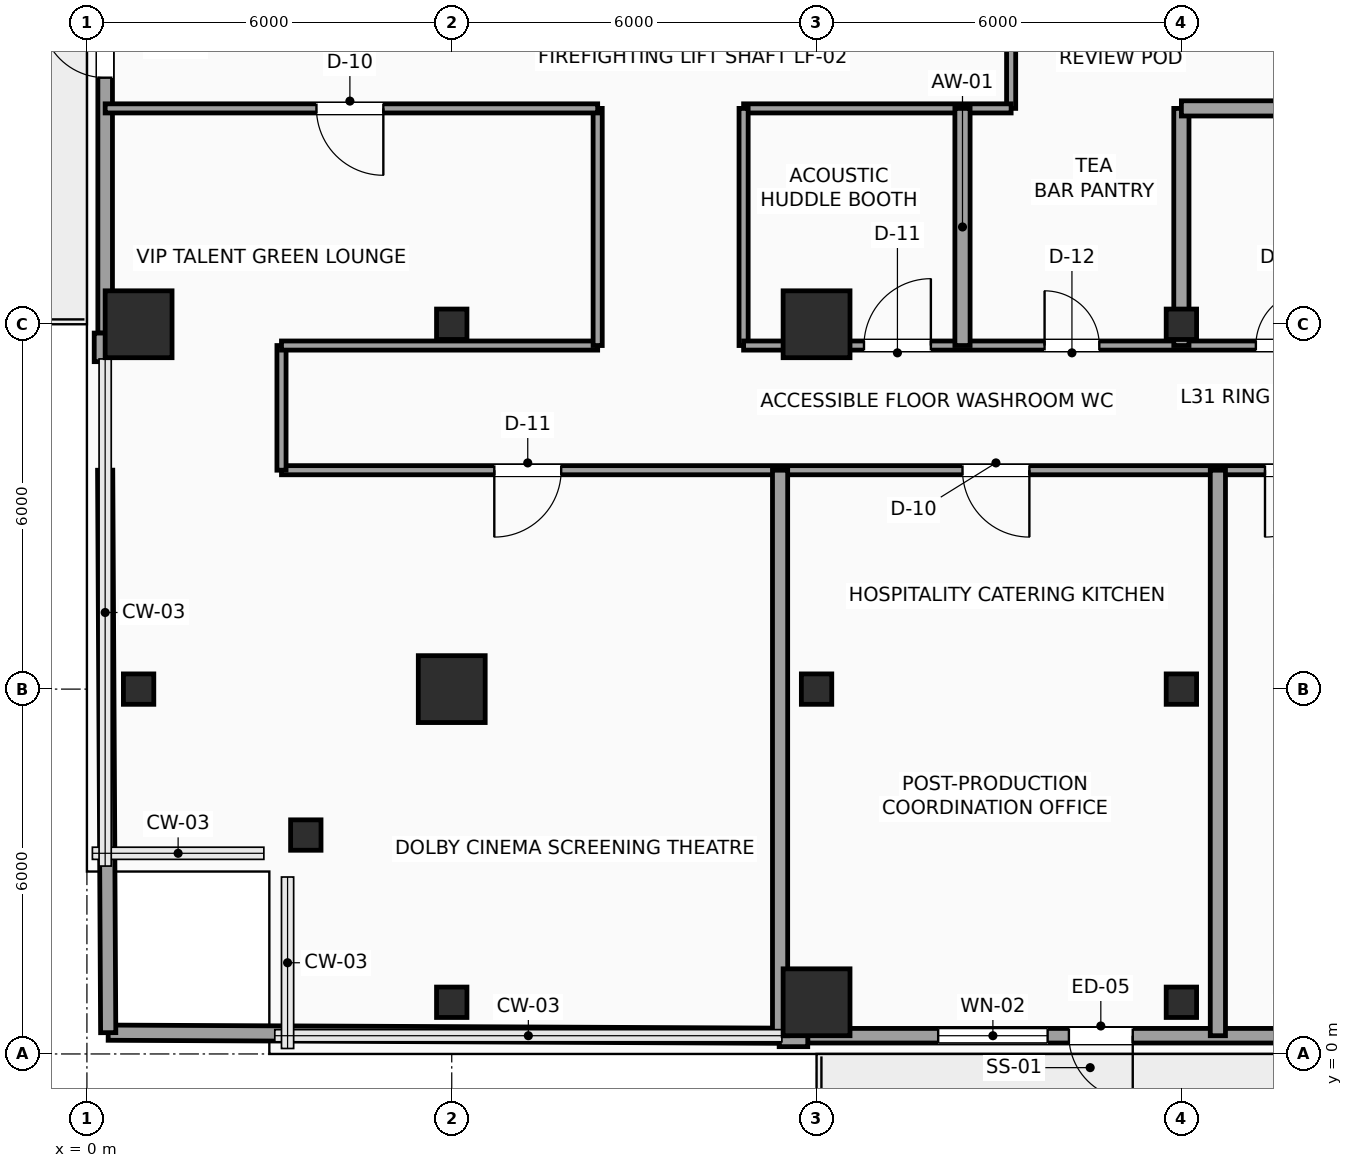
"""IFC4 building model, lengths in metres.
Left out: names, types, materials, properties, quantities, classifications, styles, units other than length and angle.
Written with IfcOpenShell. Run it as: python <this file> out.ifc"""

import sys

from ifc_helpers import new_model, si_unit, direction, frame, frame_2d, origin, origin_2d, place, context, subcontext, project, spatial, rectangle, hollow_rectangle, extrude, element, fill, save


model = new_model("IFC4")
c1 = context("Model", 3, precision=1e-05, world=origin(), true_north=direction((0.0, 1.0)))
c2 = subcontext(c1, "Body", "Model", "MODEL_VIEW")
j1 = project(units=[si_unit("LENGTHUNIT", "METRE"), si_unit("PLANEANGLEUNIT", "RADIAN")], contexts=[c1])
p1 = place(None, origin())
s1 = spatial("IfcSite", under=j1, at=p1, CompositionType="ELEMENT")
p2 = place(p1, origin())
s2 = spatial("IfcBuilding", under=s1, at=p2, CompositionType="ELEMENT")
p3 = place(p2, frame((0.0, 0.0, 130.65)))
s3 = spatial("IfcBuildingStorey", under=s2, at=p3, CompositionType="ELEMENT", Elevation=130.65)
for number, where, z_axis, x_axis in (
    (1, (3.6, 3.6, 0.0), (0.0, 0.0, 1.0), (1.0, 0.0, 0.0)),
    (2, (0.85, 6.0, 0.0), (0.0, 0.0, 1.0), (1.0, 0.0, 0.0)),
):
    element("IfcColumn", number, at=place(p3, frame(where, z_axis=z_axis, x_axis=x_axis)), inside=s3, PredefinedType="COLUMN", context=c2, shape_type="SweptSolid", body=[
        extrude(hollow_rectangle(XDim=0.5, YDim=0.5, WallThickness=0.025, InnerFilletRadius=0.025, OuterFilletRadius=0.04, at=origin_2d()), origin(), (0.0, 0.0, 1.0), 3.75),
    ])
p4 = place(p3, frame((0.85, 12.0, 0.0), z_axis=(0.0, 0.0, 1.0), x_axis=(1.0, 0.0, 0.0)))
e3 = element("IfcColumn", 3, at=p4, inside=s3, PredefinedType="COLUMN", context=c2, shape_type="SweptSolid", body=[
    extrude(rectangle(XDim=1.1, YDim=1.1, at=origin_2d()), origin(), (0.0, 0.0, 1.0), 3.75),
])
p5 = place(p3, frame((6.0, 0.85, 0.0), z_axis=(0.0, 0.0, 1.0), x_axis=(1.0, 0.0, 0.0)))
e4 = element("IfcColumn", 4, at=p5, inside=s3, PredefinedType="COLUMN", context=c2, shape_type="SweptSolid", body=[
    extrude(hollow_rectangle(XDim=0.5, YDim=0.5, WallThickness=0.025, InnerFilletRadius=0.025, OuterFilletRadius=0.04, at=origin_2d()), origin(), (0.0, 0.0, 1.0), 3.75),
])
p6 = place(p3, frame((6.0, 6.0, 0.0), z_axis=(0.0, 0.0, 1.0), x_axis=(1.0, 0.0, 0.0)))
e5 = element("IfcColumn", 5, at=p6, inside=s3, PredefinedType="COLUMN", context=c2, shape_type="SweptSolid", body=[
    extrude(rectangle(XDim=1.1, YDim=1.1, at=origin_2d()), origin(), (0.0, 0.0, 1.0), 3.75),
])
p7 = place(p3, frame((6.0, 12.0, 0.0), z_axis=(0.0, 0.0, 1.0), x_axis=(1.0, 0.0, 0.0)))
e6 = element("IfcColumn", 6, at=p7, inside=s3, PredefinedType="COLUMN", context=c2, shape_type="SweptSolid", body=[
    extrude(hollow_rectangle(XDim=0.5, YDim=0.5, WallThickness=0.025, InnerFilletRadius=0.025, OuterFilletRadius=0.04, at=origin_2d()), origin(), (0.0, 0.0, 1.0), 3.75),
])
p8 = place(p3, frame((12.0, 0.85, 0.0), z_axis=(0.0, 0.0, 1.0), x_axis=(1.0, 0.0, 0.0)))
e7 = element("IfcColumn", 7, at=p8, inside=s3, PredefinedType="COLUMN", context=c2, shape_type="SweptSolid", body=[
    extrude(rectangle(XDim=1.1, YDim=1.1, at=origin_2d()), origin(), (0.0, 0.0, 1.0), 3.75),
])
p9 = place(p3, frame((12.0, 6.0, 0.0), z_axis=(0.0, 0.0, 1.0), x_axis=(1.0, 0.0, 0.0)))
e8 = element("IfcColumn", 8, at=p9, inside=s3, PredefinedType="COLUMN", context=c2, shape_type="SweptSolid", body=[
    extrude(hollow_rectangle(XDim=0.5, YDim=0.5, WallThickness=0.025, InnerFilletRadius=0.025, OuterFilletRadius=0.04, at=origin_2d()), origin(), (0.0, 0.0, 1.0), 3.75),
])
p10 = place(p3, frame((12.0, 12.0, 0.0), z_axis=(0.0, 0.0, 1.0), x_axis=(1.0, 0.0, 0.0)))
e9 = element("IfcColumn", 9, at=p10, inside=s3, PredefinedType="COLUMN", context=c2, shape_type="SweptSolid", body=[
    extrude(rectangle(XDim=1.1, YDim=1.1, at=origin_2d()), origin(), (0.0, 0.0, 1.0), 3.75),
])
for number, where, z_axis, x_axis in (
    (10, (18.0, 0.85, 0.0), (0.0, 0.0, 1.0), (1.0, 0.0, 0.0)),
    (11, (18.0, 6.0, 0.0), (0.0, 0.0, 1.0), (1.0, 0.0, 0.0)),
    (12, (18.0, 12.0, 0.0), (0.0, 0.0, 1.0), (1.0, 0.0, 0.0)),
):
    element("IfcColumn", number, at=place(p3, frame(where, z_axis=z_axis, x_axis=x_axis)), inside=s3, PredefinedType="COLUMN", context=c2, shape_type="SweptSolid", body=[
        extrude(hollow_rectangle(XDim=0.5, YDim=0.5, WallThickness=0.025, InnerFilletRadius=0.025, OuterFilletRadius=0.04, at=origin_2d()), origin(), (0.0, 0.0, 1.0), 3.75),
    ])
p11 = place(p3, frame((21.145, 0.3, 0.0), z_axis=(0.0, 0.0, 1.0), x_axis=(-1.0, 0.0, 0.0)))
e13 = element("IfcWall", 13, at=p11, inside=s3, PredefinedType="SOLIDWALL", context=c2, shape_type="SweptSolid", body=[
    extrude(rectangle(XDim=9.29, YDim=0.24, at=frame_2d((4.645, 0.0))), origin(), (0.0, 0.0, 1.0), 3.525),
])
p12 = place(p11, frame((3.945, 0.0, 0.0)))
e14 = element("IfcOpeningElement", 14, at=p12, cuts=e13, PredefinedType="OPENING", context=c2, shape_type="SweptSolid", body=[
    extrude(rectangle(XDim=1.05, YDim=2.2, at=frame_2d((0.525, 1.1))), frame((0.0, 0.13, 0.0), z_axis=(0.0, -1.0, 0.0), x_axis=(1.0, 0.0, 0.0)), (0.0, 0.0, 1.0), 0.26),
])
p13 = place(p11, frame((5.345, 0.0, 0.85)))
e15 = element("IfcOpeningElement", 15, at=p13, cuts=e13, PredefinedType="OPENING", context=c2, shape_type="SweptSolid", body=[
    extrude(rectangle(XDim=1.8, YDim=2.1, at=frame_2d((0.9, 1.05))), frame((0.0, 0.13, 0.0), z_axis=(0.0, -1.0, 0.0), x_axis=(1.0, 0.0, 0.0)), (0.0, 0.0, 1.0), 0.26),
])
p14 = place(p3, frame((0.3, 11.855, 0.0), z_axis=(0.0, 0.0, 1.0), x_axis=(0.0, 1.0, 0.0)))
e16 = element("IfcWall", 16, at=p14, inside=s3, PredefinedType="SOLIDWALL", context=c2, shape_type="SweptSolid", body=[
    extrude(rectangle(XDim=9.29, YDim=0.24, at=frame_2d((4.645, 0.0))), origin(), (0.0, 0.0, 1.0), 3.525),
])
p15 = place(p14, frame((4.2, 0.0, 0.0)))
e17 = element("IfcOpeningElement", 17, at=p15, cuts=e16, PredefinedType="OPENING", context=c2, shape_type="SweptSolid", body=[
    extrude(rectangle(XDim=1.05, YDim=2.2, at=frame_2d((0.525, 1.1))), frame((0.0, 0.13, 0.0), z_axis=(0.0, -1.0, 0.0), x_axis=(1.0, 0.0, 0.0)), (0.0, 0.0, 1.0), 0.26),
])
p16 = place(p14, frame((6.8, 0.0, 0.85)))
e18 = element("IfcOpeningElement", 18, at=p16, cuts=e16, PredefinedType="OPENING", context=c2, shape_type="SweptSolid", body=[
    extrude(rectangle(XDim=1.8, YDim=2.1, at=frame_2d((0.9, 1.05))), frame((0.0, 0.13, 0.0), z_axis=(0.0, -1.0, 0.0), x_axis=(1.0, 0.0, 0.0)), (0.0, 0.0, 1.0), 0.26),
])
for number, where, z_axis, x_axis in (
    (19, (0.24, 11.385, 0.0), (0.0, 0.0, 1.0), (0.0, 1.0, 0.0)),
    (20, (11.855, 0.24, 0.0), (0.0, 0.0, 1.0), (-1.0, 0.0, 0.0)),
):
    element("IfcWall", number, at=place(p3, frame(where, z_axis=z_axis, x_axis=x_axis)), inside=s3, PredefinedType="SOLIDWALL", context=c2, shape_type="SweptSolid", body=[
        extrude(rectangle(XDim=0.47, YDim=0.24, at=frame_2d((0.235, 0.0))), origin(), (0.0, 0.0, 1.0), 3.525),
    ])
p17 = place(p3, frame((21.35, 9.6, 0.0), z_axis=(0.0, 0.0, 1.0), x_axis=(-1.0, 0.0, 0.0)))
e21 = element("IfcWall", 21, at=p17, inside=s3, PredefinedType="PARTITIONING", context=c2, shape_type="SweptSolid", body=[
    extrude(rectangle(XDim=18.15, YDim=0.15, at=frame_2d((9.075, 0.0))), origin(), (0.0, 0.0, 1.0), 3.525),
])
p18 = place(p17, frame((13.55, 0.0, 0.0)))
e22 = element("IfcOpeningElement", 22, at=p18, cuts=e21, PredefinedType="OPENING", context=c2, shape_type="SweptSolid", body=[
    extrude(rectangle(XDim=1.1, YDim=2.25, at=frame_2d((0.55, 1.125))), frame((0.0, 0.085, 0.0), z_axis=(0.0, -1.0, 0.0), x_axis=(1.0, 0.0, 0.0)), (0.0, 0.0, 1.0), 0.17),
])
p19 = place(p17, frame((5.85, 0.0, 0.0)))
e23 = element("IfcOpeningElement", 23, at=p19, cuts=e21, PredefinedType="OPENING", context=c2, shape_type="SweptSolid", body=[
    extrude(rectangle(XDim=1.1, YDim=2.25, at=frame_2d((0.55, 1.125))), frame((0.0, 0.085, 0.0), z_axis=(0.0, -1.0, 0.0), x_axis=(1.0, 0.0, 0.0)), (0.0, 0.0, 1.0), 0.17),
])
p20 = place(p17, frame((0.875, 0.0, 0.0)))
e24 = element("IfcOpeningElement", 24, at=p20, cuts=e21, PredefinedType="OPENING", context=c2, shape_type="SweptSolid", body=[
    extrude(rectangle(XDim=1.1, YDim=2.25, at=frame_2d((0.55, 1.125))), frame((0.0, 0.085, 0.0), z_axis=(0.0, -1.0, 0.0), x_axis=(1.0, 0.0, 0.0)), (0.0, 0.0, 1.0), 0.17),
])
p21 = place(p3, frame((3.2, 9.6, 0.0), z_axis=(0.0, 0.0, 1.0), x_axis=(0.0, 1.0, 0.0)))
e25 = element("IfcWall", 25, at=p21, inside=s3, PredefinedType="PARTITIONING", context=c2, shape_type="SweptSolid", body=[
    extrude(rectangle(XDim=2.05, YDim=0.15, at=frame_2d((1.025, 0.0))), origin(), (0.0, 0.0, 1.0), 3.525),
])
p22 = place(p3, frame((3.2, 11.65, 0.0), z_axis=(0.0, 0.0, 1.0), x_axis=(1.0, 0.0, 0.0)))
e26 = element("IfcWall", 26, at=p22, inside=s3, PredefinedType="PARTITIONING", context=c2, shape_type="SweptSolid", body=[
    extrude(rectangle(XDim=5.2, YDim=0.15, at=frame_2d((2.6, 0.0))), origin(), (0.0, 0.0, 1.0), 3.525),
])
p23 = place(p3, frame((8.4, 11.65, 0.0), z_axis=(0.0, 0.0, 1.0), x_axis=(0.0, 1.0, 0.0)))
e27 = element("IfcWall", 27, at=p23, inside=s3, PredefinedType="PARTITIONING", context=c2, shape_type="SweptSolid", body=[
    extrude(rectangle(XDim=3.9, YDim=0.15, at=frame_2d((1.95, 0.0))), origin(), (0.0, 0.0, 1.0), 3.525),
])
p24 = place(p3, frame((8.4, 15.55, 0.0), z_axis=(0.0, 0.0, 1.0), x_axis=(-1.0, 0.0, 0.0)))
e28 = element("IfcWall", 28, at=p24, inside=s3, PredefinedType="PARTITIONING", context=c2, shape_type="SweptSolid", body=[
    extrude(rectangle(XDim=8.1, YDim=0.15, at=frame_2d((4.05, 0.0))), origin(), (0.0, 0.0, 1.0), 3.525),
])
p25 = place(p24, frame((3.525, 0.0, 0.0)))
e29 = element("IfcOpeningElement", 29, at=p25, cuts=e28, PredefinedType="OPENING", context=c2, shape_type="SweptSolid", body=[
    extrude(rectangle(XDim=1.1, YDim=2.25, at=frame_2d((0.55, 1.125))), frame((0.0, 0.085, 0.0), z_axis=(0.0, -1.0, 0.0), x_axis=(1.0, 0.0, 0.0)), (0.0, 0.0, 1.0), 0.17),
])
p26 = place(p3, frame((15.2, 17.95, 0.0), z_axis=(0.0, 0.0, 1.0), x_axis=(0.0, -1.0, 0.0)))
e30 = element("IfcWall", 30, at=p26, inside=s3, PredefinedType="PARTITIONING", context=c2, shape_type="SweptSolid", body=[
    extrude(rectangle(XDim=2.4, YDim=0.15, at=frame_2d((1.2, 0.0))), origin(), (0.0, 0.0, 1.0), 3.525),
])
p27 = place(p3, frame((15.2, 15.55, 0.0), z_axis=(0.0, 0.0, 1.0), x_axis=(-1.0, 0.0, 0.0)))
e31 = element("IfcWall", 31, at=p27, inside=s3, PredefinedType="PARTITIONING", context=c2, shape_type="SweptSolid", body=[
    extrude(rectangle(XDim=4.4, YDim=0.15, at=frame_2d((2.2, 0.0))), origin(), (0.0, 0.0, 1.0), 3.525),
])
p28 = place(p3, frame((10.8, 15.55, 0.0), z_axis=(0.0, 0.0, 1.0), x_axis=(0.0, -1.0, 0.0)))
e32 = element("IfcWall", 32, at=p28, inside=s3, PredefinedType="PARTITIONING", context=c2, shape_type="SweptSolid", body=[
    extrude(rectangle(XDim=3.9, YDim=0.15, at=frame_2d((1.95, 0.0))), origin(), (0.0, 0.0, 1.0), 3.525),
])
p29 = place(p3, frame((10.8, 11.65, 0.0), z_axis=(0.0, 0.0, 1.0), x_axis=(1.0, 0.0, 0.0)))
e33 = element("IfcWall", 33, at=p29, inside=s3, PredefinedType="PARTITIONING", context=c2, shape_type="SweptSolid", body=[
    extrude(rectangle(XDim=10.55, YDim=0.15, at=frame_2d((5.275, 0.0))), origin(), (0.0, 0.0, 1.0), 3.525),
])
p30 = place(p29, frame((1.98, 0.0, 0.0)))
e34 = element("IfcOpeningElement", 34, at=p30, cuts=e33, PredefinedType="OPENING", context=c2, shape_type="SweptSolid", body=[
    extrude(rectangle(XDim=1.1, YDim=2.25, at=frame_2d((0.55, 1.125))), frame((0.0, 0.085, 0.0), z_axis=(0.0, -1.0, 0.0), x_axis=(1.0, 0.0, 0.0)), (0.0, 0.0, 1.0), 0.17),
])
p31 = place(p29, frame((4.95, 0.0, 0.0)))
e35 = element("IfcOpeningElement", 35, at=p31, cuts=e33, PredefinedType="OPENING", context=c2, shape_type="SweptSolid", body=[
    extrude(rectangle(XDim=0.9, YDim=2.1, at=frame_2d((0.45, 1.05))), frame((0.0, 0.085, 0.0), z_axis=(0.0, -1.0, 0.0), x_axis=(1.0, 0.0, 0.0)), (0.0, 0.0, 1.0), 0.17),
])
p32 = place(p29, frame((8.425, 0.0, 0.0)))
e36 = element("IfcOpeningElement", 36, at=p32, cuts=e33, PredefinedType="OPENING", context=c2, shape_type="SweptSolid", body=[
    extrude(rectangle(XDim=0.9, YDim=2.1, at=frame_2d((0.45, 1.05))), frame((0.0, 0.085, 0.0), z_axis=(0.0, -1.0, 0.0), x_axis=(1.0, 0.0, 0.0)), (0.0, 0.0, 1.0), 0.17),
])
p33 = place(p3, frame((14.4, 11.65, 0.0), z_axis=(0.0, 0.0, 1.0), x_axis=(0.0, 1.0, 0.0)))
e37 = element("IfcWall", 37, at=p33, inside=s3, PredefinedType="PARTITIONING", context=c2, shape_type="SweptSolid", body=[
    extrude(rectangle(XDim=3.9, YDim=0.25, at=frame_2d((1.95, 0.0))), origin(), (0.0, 0.0, 1.0), 3.525),
])
p34 = place(p3, frame((18.0, 11.65, 0.0), z_axis=(0.0, 0.0, 1.0), x_axis=(0.0, 1.0, 0.0)))
e38 = element("IfcWall", 38, at=p34, inside=s3, PredefinedType="PARTITIONING", context=c2, shape_type="SweptSolid", body=[
    extrude(rectangle(XDim=3.9, YDim=0.25, at=frame_2d((1.95, 0.0))), origin(), (0.0, 0.0, 1.0), 3.017),
])
p35 = place(p3, frame((18.0, 15.55, 0.0), z_axis=(0.0, 0.0, 1.0), x_axis=(1.0, 0.0, 0.0)))
e39 = element("IfcWall", 39, at=p35, inside=s3, PredefinedType="PARTITIONING", context=c2, shape_type="SweptSolid", body=[
    extrude(rectangle(XDim=3.35, YDim=0.25, at=frame_2d((1.675, 0.0))), origin(), (0.0, 0.0, 1.0), 3.525),
])
p36 = place(p3, frame((0.35, 0.35, 0.0), z_axis=(0.0, 0.0, 1.0), x_axis=(0.999989714785, -0.004535451924, 0.0)))
e40 = element("IfcWall", 40, at=p36, inside=s3, PredefinedType="PARTITIONING", context=c2, shape_type="SweptSolid", body=[
    extrude(rectangle(XDim=11.035, YDim=0.25, at=frame_2d((5.518, 0.0))), origin(), (0.0, 0.0, 1.0), 3.525),
])
p37 = place(p3, frame((0.35, 0.35, 0.0), z_axis=(0.0, 0.0, 1.0), x_axis=(-0.005410604923, 0.99998536257, 0.0)))
e41 = element("IfcWall", 41, at=p37, inside=s3, PredefinedType="PARTITIONING", context=c2, shape_type="SweptSolid", body=[
    extrude(rectangle(XDim=9.25, YDim=0.25, at=frame_2d((4.625, 0.0))), origin(), (0.0, 0.0, 1.0), 3.525),
])
for number, where, z_axis, x_axis in (
    (42, (11.4, 0.3, 0.0), (0.0, 0.0, 1.0), (0.0, 1.0, 0.0)),
    (43, (18.6, 0.3, 0.0), (0.0, 0.0, 1.0), (0.0, 1.0, 0.0)),
):
    element("IfcWall", number, at=place(p3, frame(where, z_axis=z_axis, x_axis=x_axis)), inside=s3, PredefinedType="PARTITIONING", context=c2, shape_type="SweptSolid", body=[
        extrude(rectangle(XDim=9.3, YDim=0.25, at=frame_2d((4.65, 0.0))), origin(), (0.0, 0.0, 1.0), 3.525),
    ])
p38 = place(p12, origin())
e44 = element("IfcDoor", 44, at=p38, inside=s3, OperationType="SINGLE_SWING_LEFT", PredefinedType="DOOR", context=c2, shape_type="SweptSolid", body=[
    extrude(rectangle(XDim=1.05, YDim=2.2, at=frame_2d((0.525, 1.1))), frame((0.0, 0.025, 0.0), z_axis=(0.0, -1.0, 0.0), x_axis=(1.0, 0.0, 0.0)), (0.0, 0.0, 1.0), 0.05),
])
fill(e14, e44)
p39 = place(p13, origin())
e45 = element("IfcWindow", 45, at=p39, inside=s3, PartitioningType="SINGLE_PANEL", PredefinedType="WINDOW", context=c2, shape_type="SweptSolid", body=[
    extrude(rectangle(XDim=1.8, YDim=2.1, at=frame_2d((0.9, 1.05))), frame((0.0, 0.03, 0.0), z_axis=(0.0, -1.0, 0.0), x_axis=(1.0, 0.0, 0.0)), (0.0, 0.0, 1.0), 0.06),
])
fill(e15, e45)
p40 = place(p15, origin())
e46 = element("IfcDoor", 46, at=p40, inside=s3, OperationType="SINGLE_SWING_RIGHT", PredefinedType="DOOR", context=c2, shape_type="SweptSolid", body=[
    extrude(rectangle(XDim=1.05, YDim=2.2, at=frame_2d((0.525, 1.1))), frame((0.0, 0.025, 0.0), z_axis=(0.0, -1.0, 0.0), x_axis=(1.0, 0.0, 0.0)), (0.0, 0.0, 1.0), 0.05),
])
fill(e17, e46)
p41 = place(p18, origin())
e47 = element("IfcDoor", 47, at=p41, inside=s3, OperationType="SINGLE_SWING_RIGHT", PredefinedType="DOOR", context=c2, shape_type="SweptSolid", body=[
    extrude(rectangle(XDim=1.1, YDim=2.25, at=frame_2d((0.55, 1.125))), frame((0.0, 0.025, 0.0), z_axis=(0.0, -1.0, 0.0), x_axis=(1.0, 0.0, 0.0)), (0.0, 0.0, 1.0), 0.05),
])
fill(e22, e47)
p42 = place(p19, origin())
e48 = element("IfcDoor", 48, at=p42, inside=s3, OperationType="SINGLE_SWING_LEFT", PredefinedType="DOOR", context=c2, shape_type="SweptSolid", body=[
    extrude(rectangle(XDim=1.1, YDim=2.25, at=frame_2d((0.55, 1.125))), frame((0.0, 0.025, 0.0), z_axis=(0.0, -1.0, 0.0), x_axis=(1.0, 0.0, 0.0)), (0.0, 0.0, 1.0), 0.05),
])
fill(e23, e48)
p43 = place(p20, origin())
e49 = element("IfcDoor", 49, at=p43, inside=s3, OperationType="SINGLE_SWING_RIGHT", PredefinedType="DOOR", context=c2, shape_type="SweptSolid", body=[
    extrude(rectangle(XDim=1.1, YDim=2.25, at=frame_2d((0.55, 1.125))), frame((0.0, 0.025, 0.0), z_axis=(0.0, -1.0, 0.0), x_axis=(1.0, 0.0, 0.0)), (0.0, 0.0, 1.0), 0.05),
])
fill(e24, e49)
p44 = place(p25, origin())
e50 = element("IfcDoor", 50, at=p44, inside=s3, OperationType="SINGLE_SWING_LEFT", PredefinedType="DOOR", context=c2, shape_type="SweptSolid", body=[
    extrude(rectangle(XDim=1.1, YDim=2.25, at=frame_2d((0.55, 1.125))), frame((0.0, 0.025, 0.0), z_axis=(0.0, -1.0, 0.0), x_axis=(1.0, 0.0, 0.0)), (0.0, 0.0, 1.0), 0.05),
])
fill(e29, e50)
p45 = place(p30, origin())
e51 = element("IfcDoor", 51, at=p45, inside=s3, OperationType="SINGLE_SWING_RIGHT", PredefinedType="DOOR", context=c2, shape_type="SweptSolid", body=[
    extrude(rectangle(XDim=1.1, YDim=2.25, at=frame_2d((0.55, 1.125))), frame((0.0, 0.025, 0.0), z_axis=(0.0, -1.0, 0.0), x_axis=(1.0, 0.0, 0.0)), (0.0, 0.0, 1.0), 0.05),
])
fill(e34, e51)
p46 = place(p31, origin())
e52 = element("IfcDoor", 52, at=p46, inside=s3, OperationType="SINGLE_SWING_LEFT", PredefinedType="DOOR", context=c2, shape_type="SweptSolid", body=[
    extrude(rectangle(XDim=0.9, YDim=2.1, at=frame_2d((0.45, 1.05))), frame((0.0, 0.025, 0.0), z_axis=(0.0, -1.0, 0.0), x_axis=(1.0, 0.0, 0.0)), (0.0, 0.0, 1.0), 0.05),
])
fill(e35, e52)
p47 = place(p32, origin())
e53 = element("IfcDoor", 53, at=p47, inside=s3, OperationType="SINGLE_SWING_RIGHT", PredefinedType="DOOR", context=c2, shape_type="SweptSolid", body=[
    extrude(rectangle(XDim=0.9, YDim=2.1, at=frame_2d((0.45, 1.05))), frame((0.0, 0.025, 0.0), z_axis=(0.0, -1.0, 0.0), x_axis=(1.0, 0.0, 0.0)), (0.0, 0.0, 1.0), 0.05),
])
fill(e36, e53)
save(model, sys.argv[1])
